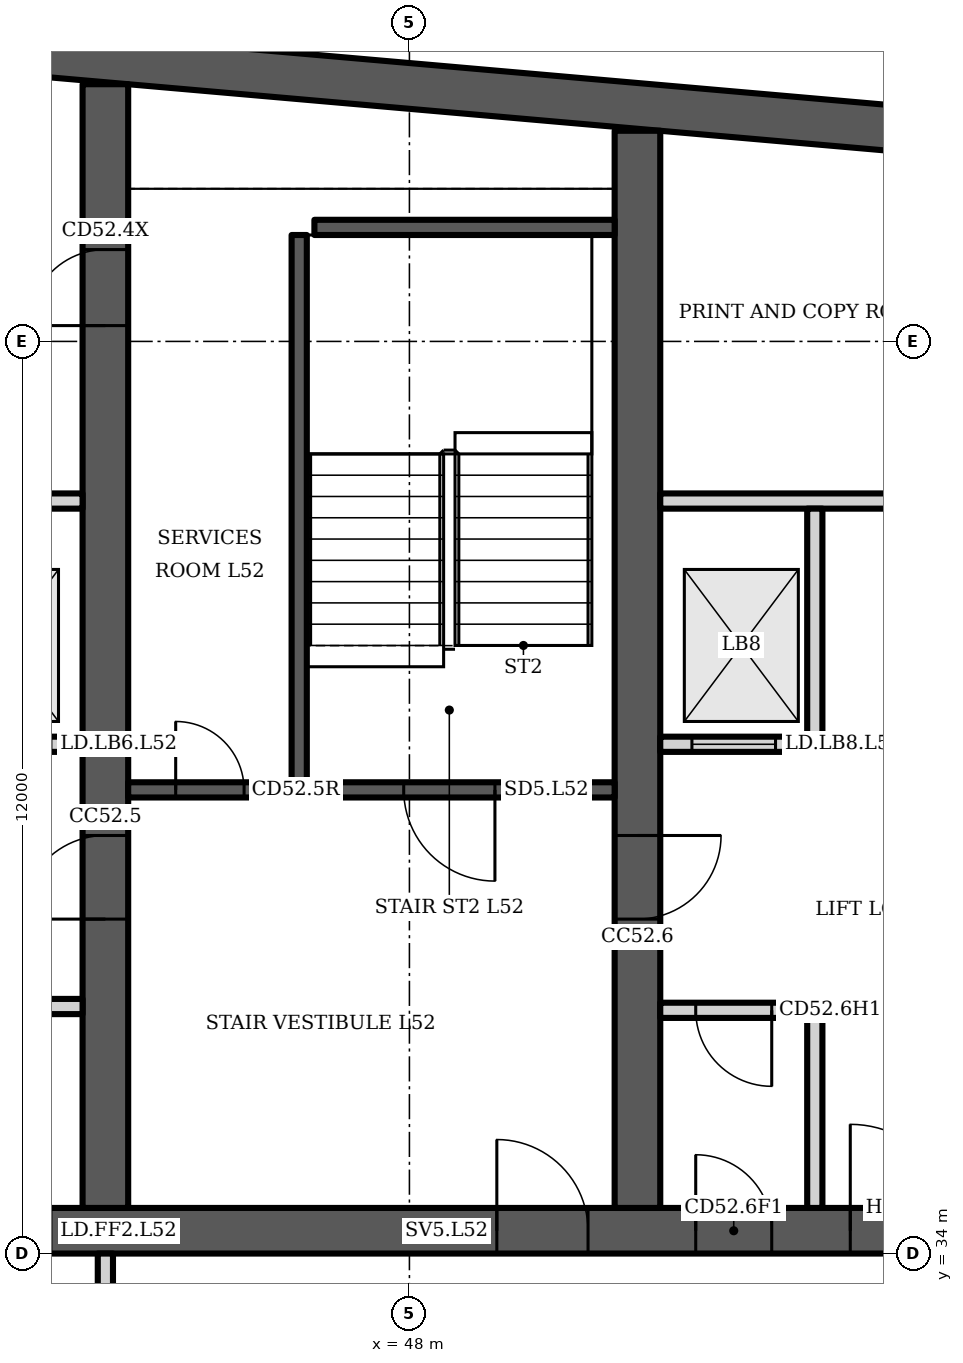
"""IFC4 building model, lengths in metres.
Left out: names, types, materials, properties, quantities, classifications, styles, units other than length and angle.
Written with IfcOpenShell. Run it as: python <this file> out.ifc"""

import sys

from ifc_helpers import new_model, si_unit, direction, frame, frame_2d, origin, place, context, subcontext, project, spatial, polyline, rectangle, outline, extrude, element, fill, save


model = new_model("IFC4")
c1 = context("Model", 3, precision=1e-05, world=origin(), true_north=direction((0.0, 1.0)))
c2 = subcontext(c1, "Body", "Model", "MODEL_VIEW")
j1 = project(units=[si_unit("LENGTHUNIT", "METRE"), si_unit("PLANEANGLEUNIT", "RADIAN")], contexts=[c1])
p1 = place(None, origin())
s1 = spatial("IfcSite", under=j1, at=p1, CompositionType="ELEMENT")
p2 = place(p1, origin())
s2 = spatial("IfcBuilding", under=s1, at=p2, CompositionType="ELEMENT")
p3 = place(p2, frame((0.0, 0.0, 210.7)))
s3 = spatial("IfcBuildingStorey", under=s2, at=p3, CompositionType="ELEMENT", Elevation=210.7)
p4 = place(p3, origin())
e1 = element("IfcWall", 1, at=p4, inside=s3, PredefinedType="SHEAR", context=c2, shape_type="SweptSolid", body=[
    extrude(outline(polyline([(23.0, 48.185), (40.5, 49.716), (58.0, 48.185), (58.0, 48.787), (40.5, 50.318), (23.0, 48.787), (23.0, 48.185)])), origin(), (0.0, 0.0, 1.0), 3.6),
])
p5 = place(p3, frame((23.0, 34.3, 0.0), z_axis=(0.0, 0.0, 1.0), x_axis=(1.0, 0.0, 0.0)))
e2 = element("IfcWall", 2, at=p5, inside=s3, PredefinedType="SHEAR", context=c2, shape_type="SweptSolid", body=[
    extrude(rectangle(XDim=35.0, YDim=0.6, at=frame_2d((17.5, 0.0))), origin(), (0.0, 0.0, 1.0), 3.6),
])
p6 = place(p5, frame((0.65, 0.0, 0.0)))
e3 = element("IfcOpeningElement", 3, at=p6, cuts=e2, PredefinedType="OPENING", context=c2, shape_type="SweptSolid", body=[
    extrude(rectangle(XDim=1.2, YDim=2.1, at=frame_2d((0.6, 1.05))), frame((0.0, 0.31, 0.0), z_axis=(0.0, -1.0, 0.0), x_axis=(1.0, 0.0, 0.0)), (0.0, 0.0, 1.0), 0.62),
])
p7 = place(p5, frame((7.717, 0.0, 0.0)))
e4 = element("IfcOpeningElement", 4, at=p7, cuts=e2, PredefinedType="OPENING", context=c2, shape_type="SweptSolid", body=[
    extrude(rectangle(XDim=1.1, YDim=2.1, at=frame_2d((0.55, 1.05))), frame((0.0, 0.31, 0.0), z_axis=(0.0, -1.0, 0.0), x_axis=(1.0, 0.0, 0.0)), (0.0, 0.0, 1.0), 0.62),
])
p8 = place(p5, frame((12.183, 0.0, 0.0)))
e5 = element("IfcOpeningElement", 5, at=p8, cuts=e2, PredefinedType="OPENING", context=c2, shape_type="SweptSolid", body=[
    extrude(rectangle(XDim=1.1, YDim=2.1, at=frame_2d((0.55, 1.05))), frame((0.0, 0.31, 0.0), z_axis=(0.0, -1.0, 0.0), x_axis=(1.0, 0.0, 0.0)), (0.0, 0.0, 1.0), 0.62),
])
p9 = place(p5, frame((9.8, 0.0, 0.0)))
e6 = element("IfcOpeningElement", 6, at=p9, cuts=e2, PredefinedType="OPENING", context=c2, shape_type="SweptSolid", body=[
    extrude(rectangle(XDim=1.4, YDim=2.1, at=frame_2d((0.7, 1.05))), frame((0.0, 0.31, 0.0), z_axis=(0.0, -1.0, 0.0), x_axis=(1.0, 0.0, 0.0)), (0.0, 0.0, 1.0), 0.62),
])
p10 = place(p5, frame((14.717, 0.0, 0.0)))
e7 = element("IfcOpeningElement", 7, at=p10, cuts=e2, PredefinedType="OPENING", context=c2, shape_type="SweptSolid", body=[
    extrude(rectangle(XDim=1.1, YDim=2.1, at=frame_2d((0.55, 1.05))), frame((0.0, 0.31, 0.0), z_axis=(0.0, -1.0, 0.0), x_axis=(1.0, 0.0, 0.0)), (0.0, 0.0, 1.0), 0.62),
])
p11 = place(p5, frame((16.95, 0.0, 0.0)))
e8 = element("IfcOpeningElement", 8, at=p11, cuts=e2, PredefinedType="OPENING", context=c2, shape_type="SweptSolid", body=[
    extrude(rectangle(XDim=1.1, YDim=2.1, at=frame_2d((0.55, 1.05))), frame((0.0, 0.31, 0.0), z_axis=(0.0, -1.0, 0.0), x_axis=(1.0, 0.0, 0.0)), (0.0, 0.0, 1.0), 0.62),
])
p12 = place(p5, frame((19.183, 0.0, 0.0)))
e9 = element("IfcOpeningElement", 9, at=p12, cuts=e2, PredefinedType="OPENING", context=c2, shape_type="SweptSolid", body=[
    extrude(rectangle(XDim=1.1, YDim=2.1, at=frame_2d((0.55, 1.05))), frame((0.0, 0.31, 0.0), z_axis=(0.0, -1.0, 0.0), x_axis=(1.0, 0.0, 0.0)), (0.0, 0.0, 1.0), 0.62),
])
p13 = place(p5, frame((26.15, 0.0, 0.0)))
e10 = element("IfcOpeningElement", 10, at=p13, cuts=e2, PredefinedType="OPENING", context=c2, shape_type="SweptSolid", body=[
    extrude(rectangle(XDim=1.2, YDim=2.1, at=frame_2d((0.6, 1.05))), frame((0.0, 0.31, 0.0), z_axis=(0.0, -1.0, 0.0), x_axis=(1.0, 0.0, 0.0)), (0.0, 0.0, 1.0), 0.62),
])
p14 = place(p5, frame((28.767, 0.0, 0.0)))
e11 = element("IfcOpeningElement", 11, at=p14, cuts=e2, PredefinedType="OPENING", context=c2, shape_type="SweptSolid", body=[
    extrude(rectangle(XDim=1.0, YDim=2.1, at=frame_2d((0.5, 1.05))), frame((0.0, 0.31, 0.0), z_axis=(0.0, -1.0, 0.0), x_axis=(1.0, 0.0, 0.0)), (0.0, 0.0, 1.0), 0.62),
])
p15 = place(p5, frame((33.083, 0.0, 0.0)))
e12 = element("IfcOpeningElement", 12, at=p15, cuts=e2, PredefinedType="OPENING", context=c2, shape_type="SweptSolid", body=[
    extrude(rectangle(XDim=1.0, YDim=2.1, at=frame_2d((0.5, 1.05))), frame((0.0, 0.31, 0.0), z_axis=(0.0, -1.0, 0.0), x_axis=(1.0, 0.0, 0.0)), (0.0, 0.0, 1.0), 0.62),
])
p16 = place(p5, frame((30.8, 0.0, 0.0)))
e13 = element("IfcOpeningElement", 13, at=p16, cuts=e2, PredefinedType="OPENING", context=c2, shape_type="SweptSolid", body=[
    extrude(rectangle(XDim=1.4, YDim=2.1, at=frame_2d((0.7, 1.05))), frame((0.0, 0.31, 0.0), z_axis=(0.0, -1.0, 0.0), x_axis=(1.0, 0.0, 0.0)), (0.0, 0.0, 1.0), 0.62),
])
p17 = place(p3, frame((44.0, 34.6, 0.0), z_axis=(0.0, 0.0, 1.0), x_axis=(0.0, 1.0, 0.0)))
e14 = element("IfcWall", 14, at=p17, inside=s3, PredefinedType="SHEAR", context=c2, shape_type="SweptSolid", body=[
    extrude(rectangle(XDim=14.784, YDim=0.6, at=frame_2d((7.392, 0.0))), origin(), (0.0, 0.0, 1.0), 3.6),
])
p18 = place(p17, frame((11.608, 0.0, 0.0)))
e15 = element("IfcOpeningElement", 15, at=p18, cuts=e14, PredefinedType="OPENING", context=c2, shape_type="SweptSolid", body=[
    extrude(rectangle(XDim=1.0, YDim=2.1, at=frame_2d((0.5, 1.05))), frame((0.0, 0.31, 0.0), z_axis=(0.0, -1.0, 0.0), x_axis=(1.0, 0.0, 0.0)), (0.0, 0.0, 1.0), 0.62),
])
p19 = place(p17, frame((3.8, 0.0, 0.0)))
e16 = element("IfcOpeningElement", 16, at=p19, cuts=e14, PredefinedType="OPENING", context=c2, shape_type="SweptSolid", body=[
    extrude(rectangle(XDim=1.1, YDim=2.1, at=frame_2d((0.55, 1.05))), frame((0.0, 0.31, 0.0), z_axis=(0.0, -1.0, 0.0), x_axis=(1.0, 0.0, 0.0)), (0.0, 0.0, 1.0), 0.62),
])
p20 = place(p3, frame((51.0, 34.6, 0.0), z_axis=(0.0, 0.0, 1.0), x_axis=(0.0, 1.0, 0.0)))
e17 = element("IfcWall", 17, at=p20, inside=s3, PredefinedType="SHEAR", context=c2, shape_type="SweptSolid", body=[
    extrude(rectangle(XDim=14.171, YDim=0.6, at=frame_2d((7.085, 0.0))), origin(), (0.0, 0.0, 1.0), 3.6),
])
p21 = place(p20, frame((3.8, 0.0, 0.0)))
e18 = element("IfcOpeningElement", 18, at=p21, cuts=e17, PredefinedType="OPENING", context=c2, shape_type="SweptSolid", body=[
    extrude(rectangle(XDim=1.1, YDim=2.1, at=frame_2d((0.55, 1.05))), frame((0.0, 0.31, 0.0), z_axis=(0.0, -1.0, 0.0), x_axis=(1.0, 0.0, 0.0)), (0.0, 0.0, 1.0), 0.62),
])
p22 = place(p3, frame((37.3, 40.7, 0.0), z_axis=(0.0, 0.0, 1.0), x_axis=(1.0, 0.0, 0.0)))
e19 = element("IfcWall", 19, at=p22, inside=s3, PredefinedType="PARTITIONING", context=c2, shape_type="SweptSolid", body=[
    extrude(rectangle(XDim=6.4, YDim=0.2, at=frame_2d((3.2, 0.0))), origin(), (0.0, 0.0, 1.0), 3.2),
])
p23 = place(p22, frame((0.417, 0.0, 0.0)))
e20 = element("IfcOpeningElement", 20, at=p23, cuts=e19, PredefinedType="OPENING", context=c2, shape_type="SweptSolid", body=[
    extrude(rectangle(XDim=1.1, YDim=2.1, at=frame_2d((0.55, 1.05))), frame((0.0, 0.11, 0.0), z_axis=(0.0, -1.0, 0.0), x_axis=(1.0, 0.0, 0.0)), (0.0, 0.0, 1.0), 0.22),
])
p24 = place(p22, frame((2.65, 0.0, 0.0)))
e21 = element("IfcOpeningElement", 21, at=p24, cuts=e19, PredefinedType="OPENING", context=c2, shape_type="SweptSolid", body=[
    extrude(rectangle(XDim=1.1, YDim=2.1, at=frame_2d((0.55, 1.05))), frame((0.0, 0.11, 0.0), z_axis=(0.0, -1.0, 0.0), x_axis=(1.0, 0.0, 0.0)), (0.0, 0.0, 1.0), 0.22),
])
p25 = place(p22, frame((4.883, 0.0, 0.0)))
e22 = element("IfcOpeningElement", 22, at=p25, cuts=e19, PredefinedType="OPENING", context=c2, shape_type="SweptSolid", body=[
    extrude(rectangle(XDim=1.1, YDim=2.1, at=frame_2d((0.55, 1.05))), frame((0.0, 0.11, 0.0), z_axis=(0.0, -1.0, 0.0), x_axis=(1.0, 0.0, 0.0)), (0.0, 0.0, 1.0), 0.22),
])
p26 = place(p3, frame((0.0, 0.0, -0.0)))
e23 = element("IfcWall", 23, at=p26, inside=s3, PredefinedType="PARTITIONING", context=c2, shape_type="SweptSolid", body=[
    extrude(outline(polyline([(41.567, 37.1), (39.433, 37.1), (39.433, 34.6), (39.233, 34.6), (39.233, 37.45), (37.3, 37.45), (37.3, 37.65), (39.233, 37.65), (39.433, 37.65), (39.433, 37.3), (41.567, 37.3), (41.567, 37.35), (41.767, 37.35), (43.7, 37.35), (43.7, 37.15), (41.767, 37.15), (41.767, 34.6), (41.567, 34.6), (41.567, 37.1)])), origin(), (0.0, 0.0, 1.0), 3.2),
])
p27 = place(p3, frame((0.0, 0.0, -0.0)))
e24 = element("IfcWall", 24, at=p27, inside=s3, PredefinedType="PARTITIONING", context=c2, shape_type="SweptSolid", body=[
    extrude(outline(polyline([(39.433, 40.8), (39.233, 40.8), (39.233, 43.8), (37.3, 43.8), (37.3, 44.0), (43.7, 44.0), (43.7, 43.8), (41.767, 43.8), (41.767, 40.8), (41.567, 40.8), (41.567, 43.8), (39.433, 43.8), (39.433, 40.8)])), origin(), (0.0, 0.0, 1.0), 3.2),
])
p28 = place(p3, frame((44.3, 40.1, 0.0), z_axis=(0.0, 0.0, 1.0), x_axis=(1.0, 0.0, 0.0)))
e25 = element("IfcWall", 25, at=p28, inside=s3, PredefinedType="SHEAR", context=c2, shape_type="SweptSolid", body=[
    extrude(rectangle(XDim=6.4, YDim=0.2, at=frame_2d((3.2, 0.0))), origin(), (0.0, 0.0, 1.0), 3.2),
])
p29 = place(p28, frame((3.625, 0.0, 0.0)))
e26 = element("IfcOpeningElement", 26, at=p29, cuts=e25, PredefinedType="OPENING", context=c2, shape_type="SweptSolid", body=[
    extrude(rectangle(XDim=1.2, YDim=2.1, at=frame_2d((0.6, 1.05))), frame((0.0, 0.11, 0.0), z_axis=(0.0, -1.0, 0.0), x_axis=(1.0, 0.0, 0.0)), (0.0, 0.0, 1.0), 0.22),
])
p30 = place(p28, frame((0.625, 0.0, 0.0)))
e27 = element("IfcOpeningElement", 27, at=p30, cuts=e25, PredefinedType="OPENING", context=c2, shape_type="SweptSolid", body=[
    extrude(rectangle(XDim=0.9, YDim=2.1, at=frame_2d((0.45, 1.05))), frame((0.0, 0.11, 0.0), z_axis=(0.0, -1.0, 0.0), x_axis=(1.0, 0.0, 0.0)), (0.0, 0.0, 1.0), 0.22),
])
p31 = place(p3, frame((46.55, 40.2, 0.0), z_axis=(0.0, 0.0, 1.0), x_axis=(0.0, 1.0, 0.0)))
e28 = element("IfcWall", 28, at=p31, inside=s3, PredefinedType="SHEAR", context=c2, shape_type="SweptSolid", body=[
    extrude(rectangle(XDim=7.2, YDim=0.2, at=frame_2d((3.6, 0.0))), origin(), (0.0, 0.0, 1.0), 3.2),
])
p32 = place(p3, frame((46.75, 47.5, 0.0), z_axis=(0.0, 0.0, 1.0), x_axis=(1.0, 0.0, 0.0)))
e29 = element("IfcWall", 29, at=p32, inside=s3, PredefinedType="SHEAR", context=c2, shape_type="SweptSolid", body=[
    extrude(rectangle(XDim=3.95, YDim=0.2, at=frame_2d((1.975, 0.0))), origin(), (0.0, 0.0, 1.0), 3.2),
])
p33 = place(p3, frame((51.3, 37.2, 0.0), z_axis=(0.0, 0.0, 1.0), x_axis=(1.0, 0.0, 0.0)))
e30 = element("IfcWall", 30, at=p33, inside=s3, PredefinedType="PARTITIONING", context=c2, shape_type="SweptSolid", body=[
    extrude(rectangle(XDim=1.933, YDim=0.2, at=frame_2d((0.967, 0.0))), origin(), (0.0, 0.0, 1.0), 3.2),
])
p34 = place(p33, frame((0.467, 0.0, 0.0)))
e31 = element("IfcOpeningElement", 31, at=p34, cuts=e30, PredefinedType="OPENING", context=c2, shape_type="SweptSolid", body=[
    extrude(rectangle(XDim=1.0, YDim=2.1, at=frame_2d((0.5, 1.05))), frame((0.0, 0.11, 0.0), z_axis=(0.0, -1.0, 0.0), x_axis=(1.0, 0.0, 0.0)), (0.0, 0.0, 1.0), 0.22),
])
p35 = place(p3, frame((51.3, 40.7, 0.0), z_axis=(0.0, 0.0, 1.0), x_axis=(1.0, 0.0, 0.0)))
e32 = element("IfcWall", 32, at=p35, inside=s3, PredefinedType="PARTITIONING", context=c2, shape_type="SweptSolid", body=[
    extrude(rectangle(XDim=6.1, YDim=0.2, at=frame_2d((3.05, 0.0))), origin(), (0.0, 0.0, 1.0), 3.2),
])
p36 = place(p35, frame((0.417, 0.0, 0.0)))
e33 = element("IfcOpeningElement", 33, at=p36, cuts=e32, PredefinedType="OPENING", context=c2, shape_type="SweptSolid", body=[
    extrude(rectangle(XDim=1.1, YDim=2.1, at=frame_2d((0.55, 1.05))), frame((0.0, 0.11, 0.0), z_axis=(0.0, -1.0, 0.0), x_axis=(1.0, 0.0, 0.0)), (0.0, 0.0, 1.0), 0.22),
])
p37 = place(p35, frame((3.617, 0.0, 0.0)))
e34 = element("IfcOpeningElement", 34, at=p37, cuts=e32, PredefinedType="OPENING", context=c2, shape_type="SweptSolid", body=[
    extrude(rectangle(XDim=1.0, YDim=2.1, at=frame_2d((0.5, 1.05))), frame((0.0, 0.11, 0.0), z_axis=(0.0, -1.0, 0.0), x_axis=(1.0, 0.0, 0.0)), (0.0, 0.0, 1.0), 0.22),
])
p38 = place(p3, frame((51.3, 43.9, 0.0), z_axis=(0.0, 0.0, 1.0), x_axis=(1.0, 0.0, 0.0)))
e35 = element("IfcWall", 35, at=p38, inside=s3, PredefinedType="PARTITIONING", context=c2, shape_type="SweptSolid", body=[
    extrude(rectangle(XDim=6.1, YDim=0.2, at=frame_2d((3.05, 0.0))), origin(), (0.0, 0.0, 1.0), 3.2),
])
p39 = place(p38, frame((3.617, 0.0, 0.0)))
e36 = element("IfcOpeningElement", 36, at=p39, cuts=e35, PredefinedType="OPENING", context=c2, shape_type="SweptSolid", body=[
    extrude(rectangle(XDim=1.0, YDim=2.1, at=frame_2d((0.5, 1.05))), frame((0.0, 0.11, 0.0), z_axis=(0.0, -1.0, 0.0), x_axis=(1.0, 0.0, 0.0)), (0.0, 0.0, 1.0), 0.22),
])
p40 = place(p3, frame((0.0, 0.0, -0.0)))
e37 = element("IfcWall", 37, at=p40, inside=s3, PredefinedType="PARTITIONING", context=c2, shape_type="SweptSolid", body=[
    extrude(outline(polyline([(53.233, 34.6), (53.233, 37.3), (53.433, 37.3), (53.433, 34.6), (53.233, 34.6)])), origin(), (0.0, 0.0, 1.0), 3.2),
])
p41 = place(p3, frame((0.0, 0.0, -0.0)))
e38 = element("IfcWall", 38, at=p41, inside=s3, PredefinedType="PARTITIONING", context=c2, shape_type="SweptSolid", body=[
    extrude(outline(polyline([(53.433, 40.8), (53.433, 43.8), (53.233, 43.8), (53.233, 40.8), (53.433, 40.8)])), origin(), (0.0, 0.0, 1.0), 3.2),
])
p42 = place(p3, frame((44.0, 30.5, 0.0), z_axis=(0.0, 0.0, 1.0), x_axis=(0.0, 1.0, 0.0)))
e39 = element("IfcWall", 39, at=p42, inside=s3, PredefinedType="PARTITIONING", context=c2, shape_type="SweptSolid", body=[
    extrude(rectangle(XDim=3.5, YDim=0.2, at=frame_2d((1.75, 0.0))), origin(), (0.0, 0.0, 1.0), 3.2),
])
p43 = place(p42, frame((1.2, 0.0, 0.0)))
e40 = element("IfcOpeningElement", 40, at=p43, cuts=e39, PredefinedType="OPENING", context=c2, shape_type="SweptSolid", body=[
    extrude(rectangle(XDim=1.1, YDim=2.1, at=frame_2d((0.55, 1.05))), frame((0.0, 0.11, 0.0), z_axis=(0.0, -1.0, 0.0), x_axis=(1.0, 0.0, 0.0)), (0.0, 0.0, 1.0), 0.22),
])
p44 = place(p18, origin())
e41 = element("IfcDoor", 41, at=p44, inside=s3, OperationType="SINGLE_SWING_LEFT", PredefinedType="DOOR", context=c2, shape_type="SweptSolid", body=[
    extrude(rectangle(XDim=1.0, YDim=2.1, at=frame_2d((0.5, 1.05))), frame((0.0, 0.025, 0.0), z_axis=(0.0, -1.0, 0.0), x_axis=(1.0, 0.0, 0.0)), (0.0, 0.0, 1.0), 0.05),
])
fill(e15, e41)
p45 = place(p29, origin())
e42 = element("IfcDoor", 42, at=p45, inside=s3, OperationType="SINGLE_SWING_RIGHT", PredefinedType="DOOR", context=c2, shape_type="SweptSolid", body=[
    extrude(rectangle(XDim=1.2, YDim=2.1, at=frame_2d((0.6, 1.05))), frame((0.0, 0.025, 0.0), z_axis=(0.0, -1.0, 0.0), x_axis=(1.0, 0.0, 0.0)), (0.0, 0.0, 1.0), 0.05),
])
fill(e26, e42)
p46 = place(p30, origin())
e43 = element("IfcDoor", 43, at=p46, inside=s3, OperationType="SINGLE_SWING_LEFT", PredefinedType="DOOR", context=c2, shape_type="SweptSolid", body=[
    extrude(rectangle(XDim=0.9, YDim=2.1, at=frame_2d((0.45, 1.05))), frame((0.0, 0.025, 0.0), z_axis=(0.0, -1.0, 0.0), x_axis=(1.0, 0.0, 0.0)), (0.0, 0.0, 1.0), 0.05),
])
fill(e27, e43)
p47 = place(p13, origin())
e44 = element("IfcDoor", 44, at=p47, inside=s3, OperationType="SINGLE_SWING_LEFT", PredefinedType="DOOR", context=c2, shape_type="SweptSolid", body=[
    extrude(rectangle(XDim=1.2, YDim=2.1, at=frame_2d((0.6, 1.05))), frame((0.0, 0.025, 0.0), z_axis=(0.0, -1.0, 0.0), x_axis=(1.0, 0.0, 0.0)), (0.0, 0.0, 1.0), 0.05),
])
fill(e10, e44)
p48 = place(p14, origin())
e45 = element("IfcDoor", 45, at=p48, inside=s3, OperationType="SINGLE_SWING_LEFT", PredefinedType="DOOR", context=c2, shape_type="SweptSolid", body=[
    extrude(rectangle(XDim=1.0, YDim=2.1, at=frame_2d((0.5, 1.05))), frame((0.0, 0.025, 0.0), z_axis=(0.0, -1.0, 0.0), x_axis=(1.0, 0.0, 0.0)), (0.0, 0.0, 1.0), 0.05),
])
fill(e11, e45)
p49 = place(p34, origin())
e46 = element("IfcDoor", 46, at=p49, inside=s3, OperationType="SINGLE_SWING_RIGHT", PredefinedType="DOOR", context=c2, shape_type="SweptSolid", body=[
    extrude(rectangle(XDim=1.0, YDim=2.1, at=frame_2d((0.5, 1.05))), frame((0.0, 0.025, 0.0), z_axis=(0.0, -1.0, 0.0), x_axis=(1.0, 0.0, 0.0)), (0.0, 0.0, 1.0), 0.05),
])
fill(e31, e46)
p50 = place(p16, origin())
e47 = element("IfcDoor", 47, at=p50, inside=s3, OperationType="DOUBLE_DOOR_SINGLE_SWING", PredefinedType="DOOR", context=c2, shape_type="SweptSolid", body=[
    extrude(rectangle(XDim=1.4, YDim=2.1, at=frame_2d((0.7, 1.05))), frame((0.0, 0.025, 0.0), z_axis=(0.0, -1.0, 0.0), x_axis=(1.0, 0.0, 0.0)), (0.0, 0.0, 1.0), 0.05),
])
fill(e13, e47)
p51 = place(p36, origin())
e48 = element("IfcDoor", 48, at=p51, inside=s3, OperationType="DOUBLE_DOOR_SLIDING", PredefinedType="DOOR", context=c2, shape_type="SweptSolid", body=[
    extrude(rectangle(XDim=1.1, YDim=2.1, at=frame_2d((0.55, 1.05))), frame((0.0, 0.025, 0.0), z_axis=(0.0, -1.0, 0.0), x_axis=(1.0, 0.0, 0.0)), (0.0, 0.0, 1.0), 0.05),
])
fill(e33, e48)
p52 = place(p19, origin())
e49 = element("IfcDoor", 49, at=p52, inside=s3, OperationType="SINGLE_SWING_LEFT", PredefinedType="DOOR", context=c2, shape_type="SweptSolid", body=[
    extrude(rectangle(XDim=1.1, YDim=2.1, at=frame_2d((0.55, 1.05))), frame((0.0, 0.025, 0.0), z_axis=(0.0, -1.0, 0.0), x_axis=(1.0, 0.0, 0.0)), (0.0, 0.0, 1.0), 0.05),
])
fill(e16, e49)
p53 = place(p21, origin())
e50 = element("IfcDoor", 50, at=p53, inside=s3, OperationType="SINGLE_SWING_RIGHT", PredefinedType="DOOR", context=c2, shape_type="SweptSolid", body=[
    extrude(rectangle(XDim=1.1, YDim=2.1, at=frame_2d((0.55, 1.05))), frame((0.0, 0.025, 0.0), z_axis=(0.0, -1.0, 0.0), x_axis=(1.0, 0.0, 0.0)), (0.0, 0.0, 1.0), 0.05),
])
fill(e18, e50)
save(model, sys.argv[1])
